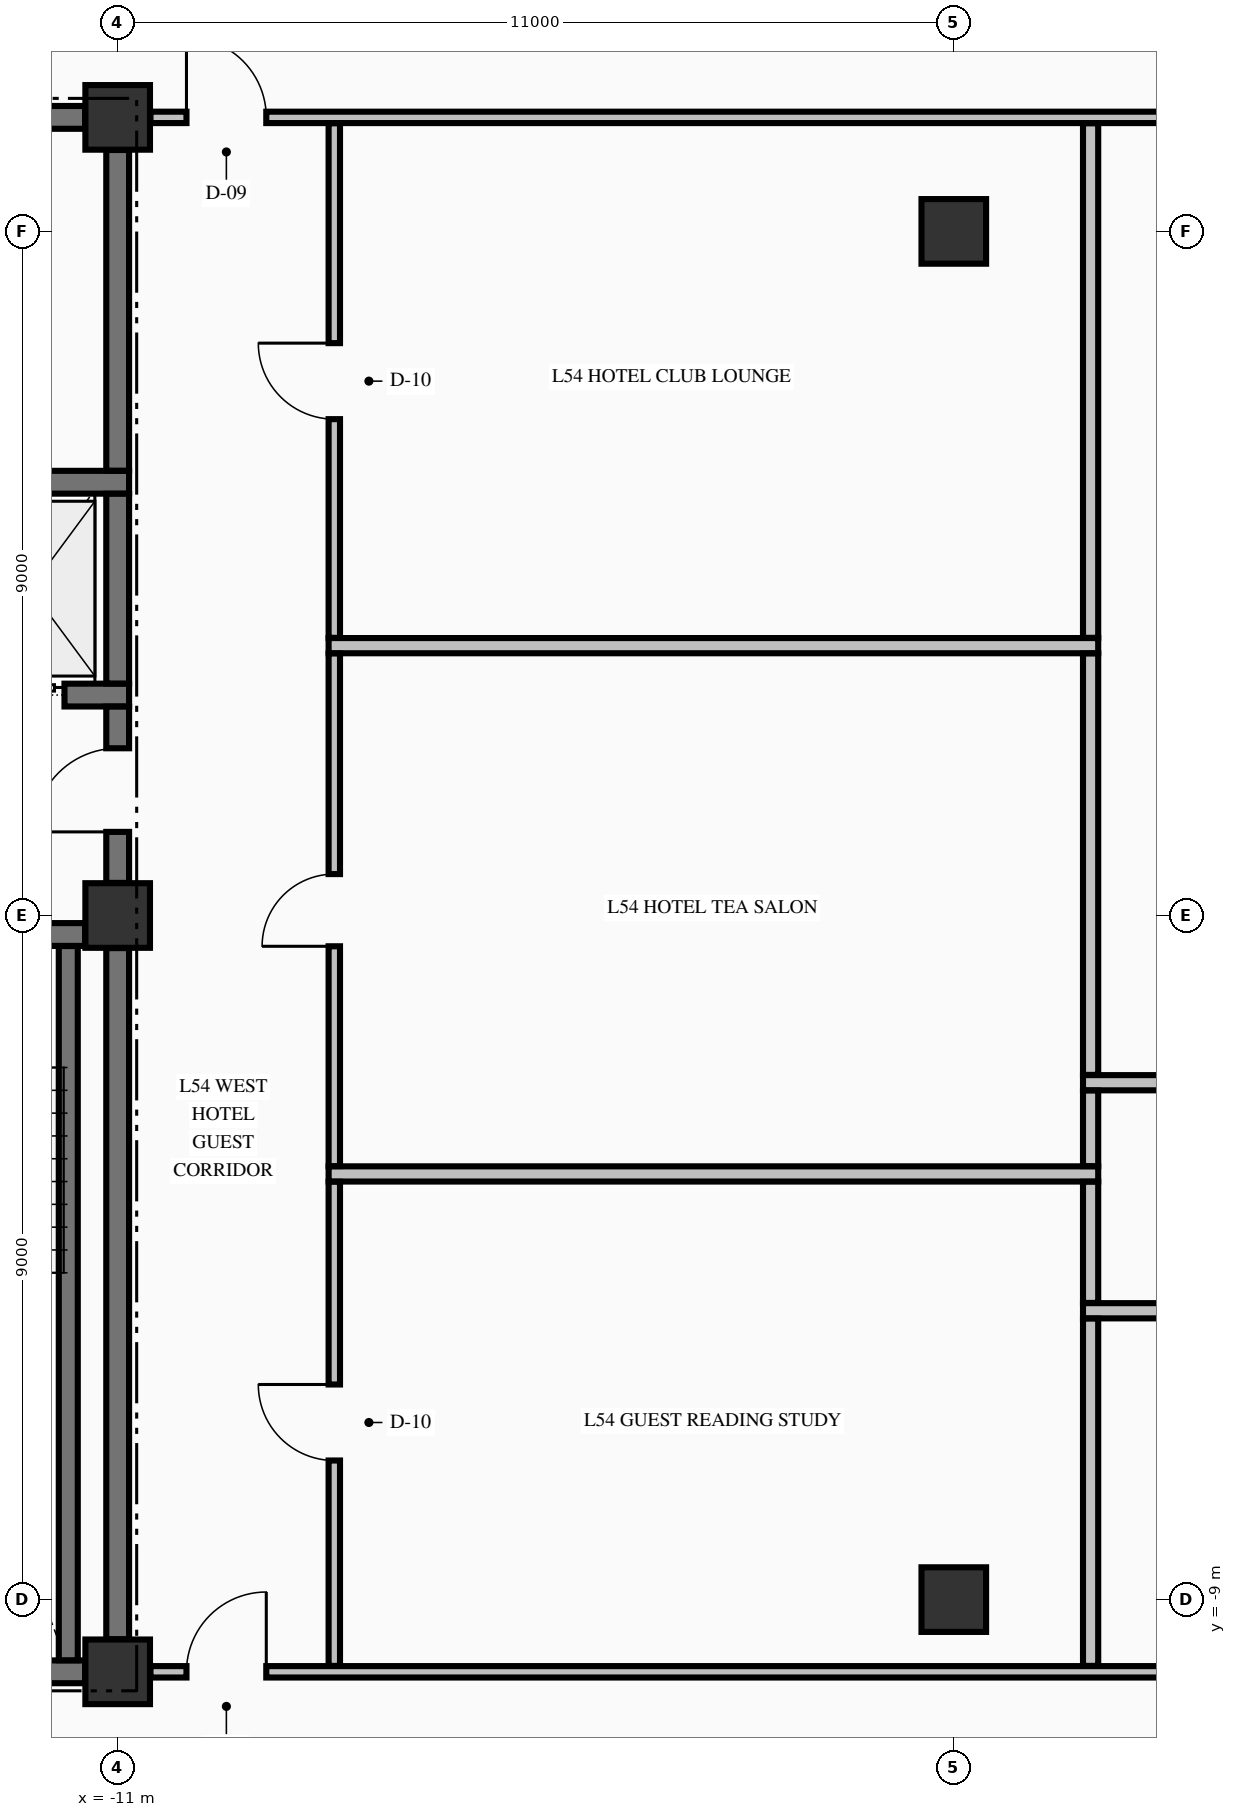
"""IFC4 building model, lengths in metres.
Left out: names, types, materials, properties, quantities, classifications, styles, units other than length and angle.
Written with IfcOpenShell. Run it as: python <this file> out.ifc"""

import sys

from ifc_helpers import new_model, si_unit, direction, frame, frame_2d, origin, origin_2d, place, context, subcontext, project, spatial, rectangle, extrude, element, fill, save


model = new_model("IFC4")
c1 = context("Model", 3, precision=1e-05, world=origin(), true_north=direction((0.0, 1.0)))
c2 = subcontext(c1, "Body", "Model", "MODEL_VIEW")
j1 = project(units=[si_unit("LENGTHUNIT", "METRE"), si_unit("PLANEANGLEUNIT", "RADIAN")], contexts=[c1])
p1 = place(None, origin())
s1 = spatial("IfcSite", under=j1, at=p1, CompositionType="ELEMENT")
p2 = place(p1, origin())
s2 = spatial("IfcBuilding", under=s1, at=p2, CompositionType="ELEMENT")
p3 = place(p2, frame((0.0, 0.0, 208.46)))
s3 = spatial("IfcBuildingStorey", under=s2, at=p3, CompositionType="ELEMENT", Elevation=208.46)
for number, where, z_axis, x_axis in (
    (1, (-11.0, -9.95, -0.25), (0.0, 0.0, 1.0), (1.0, 0.0, 0.0)),
    (2, (-11.0, 0.0, -0.25), (0.0, 0.0, 1.0), (1.0, 0.0, 0.0)),
    (3, (-11.0, 10.5, -0.25), (0.0, 0.0, 1.0), (1.0, 0.0, 0.0)),
    (4, (0.0, -9.0, -0.25), (0.0, 0.0, 1.0), (1.0, 0.0, 0.0)),
    (5, (0.0, 9.0, -0.25), (0.0, 0.0, 1.0), (1.0, 0.0, 0.0)),
):
    element("IfcColumn", number, at=place(p3, frame(where, z_axis=z_axis, x_axis=x_axis)), inside=s3, PredefinedType="COLUMN", context=c2, shape_type="SweptSolid", body=[
        extrude(rectangle(XDim=0.85, YDim=0.85, at=origin_2d()), origin(), (0.0, 0.0, 1.0), 3.325),
    ])
p4 = place(p3, frame((-14.7, -9.95, 0.0), z_axis=(0.0, 0.0, 1.0), x_axis=(1.0, 0.0, 0.0)))
e6 = element("IfcWall", 6, at=p4, inside=s3, PredefinedType="SHEAR", context=c2, shape_type="SweptSolid", body=[
    extrude(rectangle(XDim=3.271, YDim=0.3, at=frame_2d((1.635, 0.0))), origin(), (0.0, 0.0, 1.0), 3.075),
])
p5 = place(p3, frame((-19.571, -0.25, 0.0), z_axis=(0.0, 0.0, 1.0), x_axis=(1.0, 0.0, 0.0)))
e7 = element("IfcWall", 7, at=p5, inside=s3, PredefinedType="SHEAR", context=c2, shape_type="SweptSolid", body=[
    extrude(rectangle(XDim=8.142, YDim=0.3, at=frame_2d((4.071, 0.0))), origin(), (0.0, 0.0, 1.0), 3.075),
])
p6 = place(p5, frame((5.871, 0.0, 0.0)))
e8 = element("IfcOpeningElement", 8, at=p6, cuts=e7, PredefinedType="OPENING", context=c2, shape_type="SweptSolid", body=[
    extrude(rectangle(XDim=1.1, YDim=2.15, at=frame_2d((0.55, 1.075))), frame((0.0, 0.16, 0.0), z_axis=(0.0, -1.0, 0.0), x_axis=(1.0, 0.0, 0.0)), (0.0, 0.0, 1.0), 0.32),
])
p7 = place(p3, frame((-14.875, 2.9, 0.0), z_axis=(0.0, 0.0, 1.0), x_axis=(1.0, 0.0, 0.0)))
e9 = element("IfcWall", 9, at=p7, inside=s3, PredefinedType="SHEAR", context=c2, shape_type="SweptSolid", body=[
    extrude(rectangle(XDim=4.025, YDim=0.3, at=frame_2d((2.012, 0.0))), origin(), (0.0, 0.0, 1.0), 3.075),
])
p8 = place(p7, frame((2.075, 0.0, 0.0)))
e10 = element("IfcOpeningElement", 10, at=p8, cuts=e9, PredefinedType="OPENING", context=c2, shape_type="SweptSolid", body=[
    extrude(rectangle(XDim=1.1, YDim=2.2, at=frame_2d((0.55, 1.1))), frame((0.0, 0.16, 0.0), z_axis=(0.0, -1.0, 0.0), x_axis=(1.0, 0.0, 0.0)), (0.0, 0.0, 1.0), 0.32),
])
p9 = place(p3, frame((-14.875, 5.7, 0.0), z_axis=(0.0, 0.0, 1.0), x_axis=(1.0, 0.0, 0.0)))
e11 = element("IfcWall", 11, at=p9, inside=s3, PredefinedType="SHEAR", context=c2, shape_type="SweptSolid", body=[
    extrude(rectangle(XDim=4.025, YDim=0.3, at=frame_2d((2.012, 0.0))), origin(), (0.0, 0.0, 1.0), 3.075),
])
p10 = place(p3, frame((-14.7, 10.5, 0.0), z_axis=(0.0, 0.0, 1.0), x_axis=(1.0, 0.0, 0.0)))
e12 = element("IfcWall", 12, at=p10, inside=s3, PredefinedType="SHEAR", context=c2, shape_type="SweptSolid", body=[
    extrude(rectangle(XDim=3.271, YDim=0.3, at=frame_2d((1.635, 0.0))), origin(), (0.0, 0.0, 1.0), 3.075),
])
p11 = place(p10, frame((0.775, 0.0, 0.0)))
e13 = element("IfcOpeningElement", 13, at=p11, cuts=e12, PredefinedType="OPENING", context=c2, shape_type="SweptSolid", body=[
    extrude(rectangle(XDim=0.95, YDim=2.15, at=frame_2d((0.475, 1.075))), frame((0.0, 0.16, 0.0), z_axis=(0.0, -1.0, 0.0), x_axis=(1.0, 0.0, 0.0)), (0.0, 0.0, 1.0), 0.32),
])
p12 = place(p3, frame((-10.569, -9.95, 0.0), z_axis=(0.0, 0.0, 1.0), x_axis=(1.0, 0.0, 0.0)))
e14 = element("IfcWall", 14, at=p12, inside=s3, PredefinedType="PARTITIONING", context=c2, shape_type="SweptSolid", body=[
    extrude(rectangle(XDim=21.138, YDim=0.15, at=frame_2d((10.569, 0.0))), origin(), (0.0, 0.0, 1.0), 3.075),
])
p13 = place(p12, frame((0.474, 0.0, 0.0)))
e15 = element("IfcOpeningElement", 15, at=p13, cuts=e14, PredefinedType="OPENING", context=c2, shape_type="SweptSolid", body=[
    extrude(rectangle(XDim=1.05, YDim=2.15, at=frame_2d((0.525, 1.075))), frame((0.0, 0.085, 0.0), z_axis=(0.0, -1.0, 0.0), x_axis=(1.0, 0.0, 0.0)), (0.0, 0.0, 1.0), 0.17),
])
p14 = place(p12, frame((19.614, 0.0, 0.0)))
e16 = element("IfcOpeningElement", 16, at=p14, cuts=e14, PredefinedType="OPENING", context=c2, shape_type="SweptSolid", body=[
    extrude(rectangle(XDim=1.05, YDim=2.15, at=frame_2d((0.525, 1.075))), frame((0.0, 0.085, 0.0), z_axis=(0.0, -1.0, 0.0), x_axis=(1.0, 0.0, 0.0)), (0.0, 0.0, 1.0), 0.17),
])
p15 = place(p12, frame((13.574, 0.0, 0.0)))
e17 = element("IfcOpeningElement", 17, at=p15, cuts=e14, PredefinedType="OPENING", context=c2, shape_type="SweptSolid", body=[
    extrude(rectangle(XDim=0.95, YDim=2.15, at=frame_2d((0.475, 1.075))), frame((0.0, 0.085, 0.0), z_axis=(0.0, -1.0, 0.0), x_axis=(1.0, 0.0, 0.0)), (0.0, 0.0, 1.0), 0.17),
])
p16 = place(p3, frame((1.7, -5.2, 0.0), z_axis=(0.0, 0.0, 1.0), x_axis=(1.0, 0.0, 0.0)))
e18 = element("IfcWall", 18, at=p16, inside=s3, PredefinedType="PARTITIONING", context=c2, shape_type="SweptSolid", body=[
    extrude(rectangle(XDim=6.525, YDim=0.2, at=frame_2d((3.263, 0.0))), origin(), (0.0, 0.0, 1.0), 3.075),
])
p17 = place(p3, frame((-8.225, -3.4, 0.0), z_axis=(0.0, 0.0, 1.0), x_axis=(1.0, 0.0, 0.0)))
e19 = element("IfcWall", 19, at=p17, inside=s3, PredefinedType="PARTITIONING", context=c2, shape_type="SweptSolid", body=[
    extrude(rectangle(XDim=10.125, YDim=0.2, at=frame_2d((5.062, 0.0))), origin(), (0.0, 0.0, 1.0), 3.075),
])
p18 = place(p3, frame((1.7, -2.2, 0.0), z_axis=(0.0, 0.0, 1.0), x_axis=(1.0, 0.0, 0.0)))
e20 = element("IfcWall", 20, at=p18, inside=s3, PredefinedType="PARTITIONING", context=c2, shape_type="SweptSolid", body=[
    extrude(rectangle(XDim=6.525, YDim=0.2, at=frame_2d((3.263, 0.0))), origin(), (0.0, 0.0, 1.0), 3.075),
])
p19 = place(p3, frame((-8.225, 3.55, 0.0), z_axis=(0.0, 0.0, 1.0), x_axis=(1.0, 0.0, 0.0)))
e21 = element("IfcWall", 21, at=p19, inside=s3, PredefinedType="PARTITIONING", context=c2, shape_type="SweptSolid", body=[
    extrude(rectangle(XDim=10.125, YDim=0.2, at=frame_2d((5.062, 0.0))), origin(), (0.0, 0.0, 1.0), 3.075),
])
p20 = place(p3, frame((-10.569, 10.5, 0.0), z_axis=(0.0, 0.0, 1.0), x_axis=(1.0, 0.0, 0.0)))
e22 = element("IfcWall", 22, at=p20, inside=s3, PredefinedType="PARTITIONING", context=c2, shape_type="SweptSolid", body=[
    extrude(rectangle(XDim=21.138, YDim=0.15, at=frame_2d((10.569, 0.0))), origin(), (0.0, 0.0, 1.0), 3.075),
])
p21 = place(p20, frame((0.474, 0.0, 0.0)))
e23 = element("IfcOpeningElement", 23, at=p21, cuts=e22, PredefinedType="OPENING", context=c2, shape_type="SweptSolid", body=[
    extrude(rectangle(XDim=1.05, YDim=2.15, at=frame_2d((0.525, 1.075))), frame((0.0, 0.085, 0.0), z_axis=(0.0, -1.0, 0.0), x_axis=(1.0, 0.0, 0.0)), (0.0, 0.0, 1.0), 0.17),
])
p22 = place(p20, frame((19.614, 0.0, 0.0)))
e24 = element("IfcOpeningElement", 24, at=p22, cuts=e22, PredefinedType="OPENING", context=c2, shape_type="SweptSolid", body=[
    extrude(rectangle(XDim=1.05, YDim=2.15, at=frame_2d((0.525, 1.075))), frame((0.0, 0.085, 0.0), z_axis=(0.0, -1.0, 0.0), x_axis=(1.0, 0.0, 0.0)), (0.0, 0.0, 1.0), 0.17),
])
p23 = place(p3, frame((-11.65, -9.798, 0.0), z_axis=(0.0, 0.0, 1.0), x_axis=(0.0, 1.0, 0.0)))
e25 = element("IfcWall", 25, at=p23, inside=s3, PredefinedType="SOLIDWALL", context=c2, shape_type="SweptSolid", body=[
    extrude(rectangle(XDim=9.396, YDim=0.25, at=frame_2d((4.698, 0.0))), origin(), (0.0, 0.0, 1.0), 3.075),
])
p24 = place(p3, frame((-11.0, -9.521, 0.0), z_axis=(0.0, 0.0, 1.0), x_axis=(0.0, 1.0, 0.0)))
e26 = element("IfcWall", 26, at=p24, inside=s3, PredefinedType="SHEAR", context=c2, shape_type="SweptSolid", body=[
    extrude(rectangle(XDim=9.092, YDim=0.3, at=frame_2d((4.546, 0.0))), origin(), (0.0, 0.0, 1.0), 3.075),
])
p25 = place(p3, frame((-11.0, 0.429, 0.0), z_axis=(0.0, 0.0, 1.0), x_axis=(0.0, 1.0, 0.0)))
e27 = element("IfcWall", 27, at=p25, inside=s3, PredefinedType="SHEAR", context=c2, shape_type="SweptSolid", body=[
    extrude(rectangle(XDim=2.319, YDim=0.3, at=frame_2d((1.16, 0.0))), origin(), (0.0, 0.0, 1.0), 3.075),
])
p26 = place(p25, frame((0.671, 0.0, 0.0)))
e28 = element("IfcOpeningElement", 28, at=p26, cuts=e27, PredefinedType="OPENING", context=c2, shape_type="SweptSolid", body=[
    extrude(rectangle(XDim=1.1, YDim=2.15, at=frame_2d((0.55, 1.075))), frame((0.0, 0.16, 0.0), z_axis=(0.0, -1.0, 0.0), x_axis=(1.0, 0.0, 0.0)), (0.0, 0.0, 1.0), 0.32),
])
p27 = place(p3, frame((-11.0, 3.052, 0.0), z_axis=(0.0, 0.0, 1.0), x_axis=(0.0, 1.0, 0.0)))
e29 = element("IfcWall", 29, at=p27, inside=s3, PredefinedType="SHEAR", context=c2, shape_type="SweptSolid", body=[
    extrude(rectangle(XDim=2.496, YDim=0.3, at=frame_2d((1.248, 0.0))), origin(), (0.0, 0.0, 1.0), 3.075),
])
p28 = place(p3, frame((-11.0, 5.852, 0.0), z_axis=(0.0, 0.0, 1.0), x_axis=(0.0, 1.0, 0.0)))
e30 = element("IfcWall", 30, at=p28, inside=s3, PredefinedType="SHEAR", context=c2, shape_type="SweptSolid", body=[
    extrude(rectangle(XDim=4.219, YDim=0.3, at=frame_2d((2.109, 0.0))), origin(), (0.0, 0.0, 1.0), 3.075),
])
p29 = place(p3, frame((-8.15, -9.872, 0.0), z_axis=(0.0, 0.0, 1.0), x_axis=(0.0, 1.0, 0.0)))
e31 = element("IfcWall", 31, at=p29, inside=s3, PredefinedType="PARTITIONING", context=c2, shape_type="SweptSolid", body=[
    extrude(rectangle(XDim=6.369, YDim=0.15, at=frame_2d((3.185, 0.0))), origin(), (0.0, 0.0, 1.0), 3.075),
])
p30 = place(p29, frame((2.702, 0.0, 0.0)))
e32 = element("IfcOpeningElement", 32, at=p30, cuts=e31, PredefinedType="OPENING", context=c2, shape_type="SweptSolid", body=[
    extrude(rectangle(XDim=1.0, YDim=2.15, at=frame_2d((0.5, 1.075))), frame((0.0, 0.085, 0.0), z_axis=(0.0, -1.0, 0.0), x_axis=(1.0, 0.0, 0.0)), (0.0, 0.0, 1.0), 0.17),
])
p31 = place(p3, frame((-8.15, -3.297, 0.0), z_axis=(0.0, 0.0, 1.0), x_axis=(0.0, 1.0, 0.0)))
e33 = element("IfcWall", 33, at=p31, inside=s3, PredefinedType="PARTITIONING", context=c2, shape_type="SweptSolid", body=[
    extrude(rectangle(XDim=6.744, YDim=0.15, at=frame_2d((3.372, 0.0))), origin(), (0.0, 0.0, 1.0), 3.075),
])
p32 = place(p31, frame((2.892, 0.0, 0.0)))
e34 = element("IfcOpeningElement", 34, at=p32, cuts=e33, PredefinedType="OPENING", context=c2, shape_type="SweptSolid", body=[
    extrude(rectangle(XDim=0.95, YDim=2.15, at=frame_2d((0.475, 1.075))), frame((0.0, 0.085, 0.0), z_axis=(0.0, -1.0, 0.0), x_axis=(1.0, 0.0, 0.0)), (0.0, 0.0, 1.0), 0.17),
])
p33 = place(p3, frame((-8.15, 3.653, 0.0), z_axis=(0.0, 0.0, 1.0), x_axis=(0.0, 1.0, 0.0)))
e35 = element("IfcWall", 35, at=p33, inside=s3, PredefinedType="PARTITIONING", context=c2, shape_type="SweptSolid", body=[
    extrude(rectangle(XDim=6.769, YDim=0.15, at=frame_2d((3.385, 0.0))), origin(), (0.0, 0.0, 1.0), 3.075),
])
p34 = place(p33, frame((2.877, 0.0, 0.0)))
e36 = element("IfcOpeningElement", 36, at=p34, cuts=e35, PredefinedType="OPENING", context=c2, shape_type="SweptSolid", body=[
    extrude(rectangle(XDim=1.0, YDim=2.15, at=frame_2d((0.5, 1.075))), frame((0.0, 0.085, 0.0), z_axis=(0.0, -1.0, 0.0), x_axis=(1.0, 0.0, 0.0)), (0.0, 0.0, 1.0), 0.17),
])
p35 = place(p3, frame((1.8, -9.872, 0.0), z_axis=(0.0, 0.0, 1.0), x_axis=(0.0, 1.0, 0.0)))
e37 = element("IfcWall", 37, at=p35, inside=s3, PredefinedType="PARTITIONING", context=c2, shape_type="SweptSolid", body=[
    extrude(rectangle(XDim=4.569, YDim=0.2, at=frame_2d((2.285, 0.0))), origin(), (0.0, 0.0, 1.0), 3.075),
])
p36 = place(p3, frame((1.8, -5.097, 0.0), z_axis=(0.0, 0.0, 1.0), x_axis=(0.0, 1.0, 0.0)))
e38 = element("IfcWall", 38, at=p36, inside=s3, PredefinedType="PARTITIONING", context=c2, shape_type="SweptSolid", body=[
    extrude(rectangle(XDim=1.594, YDim=0.2, at=frame_2d((0.797, 0.0))), origin(), (0.0, 0.0, 1.0), 3.075),
])
p37 = place(p3, frame((1.8, -3.297, 0.0), z_axis=(0.0, 0.0, 1.0), x_axis=(0.0, 1.0, 0.0)))
e39 = element("IfcWall", 39, at=p37, inside=s3, PredefinedType="PARTITIONING", context=c2, shape_type="SweptSolid", body=[
    extrude(rectangle(XDim=0.994, YDim=0.2, at=frame_2d((0.497, 0.0))), origin(), (0.0, 0.0, 1.0), 3.075),
])
p38 = place(p3, frame((1.8, -2.097, 0.0), z_axis=(0.0, 0.0, 1.0), x_axis=(0.0, 1.0, 0.0)))
e40 = element("IfcWall", 40, at=p38, inside=s3, PredefinedType="PARTITIONING", context=c2, shape_type="SweptSolid", body=[
    extrude(rectangle(XDim=5.544, YDim=0.2, at=frame_2d((2.772, 0.0))), origin(), (0.0, 0.0, 1.0), 3.075),
])
p39 = place(p3, frame((1.8, 3.653, 0.0), z_axis=(0.0, 0.0, 1.0), x_axis=(0.0, 1.0, 0.0)))
e41 = element("IfcWall", 41, at=p39, inside=s3, PredefinedType="PARTITIONING", context=c2, shape_type="SweptSolid", body=[
    extrude(rectangle(XDim=6.769, YDim=0.2, at=frame_2d((3.385, 0.0))), origin(), (0.0, 0.0, 1.0), 3.075),
])
p40 = place(p26, origin())
e42 = element("IfcDoor", 42, at=p40, inside=s3, OperationType="SINGLE_SWING_LEFT", PredefinedType="DOOR", context=c2, shape_type="SweptSolid", body=[
    extrude(rectangle(XDim=1.1, YDim=2.15, at=frame_2d((0.55, 1.075))), frame((0.0, 0.025, 0.0), z_axis=(0.0, -1.0, 0.0), x_axis=(1.0, 0.0, 0.0)), (0.0, 0.0, 1.0), 0.05),
])
fill(e28, e42)
p41 = place(p8, origin())
e43 = element("IfcDoor", 43, at=p41, inside=s3, OperationType="SLIDING_TO_LEFT", PredefinedType="DOOR", context=c2, shape_type="SweptSolid", body=[
    extrude(rectangle(XDim=1.1, YDim=2.2, at=frame_2d((0.55, 1.1))), frame((0.0, 0.025, 0.0), z_axis=(0.0, -1.0, 0.0), x_axis=(1.0, 0.0, 0.0)), (0.0, 0.0, 1.0), 0.05),
])
fill(e10, e43)
p42 = place(p21, origin())
e44 = element("IfcDoor", 44, at=p42, inside=s3, OperationType="SINGLE_SWING_LEFT", PredefinedType="DOOR", context=c2, shape_type="SweptSolid", body=[
    extrude(rectangle(XDim=1.05, YDim=2.15, at=frame_2d((0.525, 1.075))), frame((0.0, 0.025, 0.0), z_axis=(0.0, -1.0, 0.0), x_axis=(1.0, 0.0, 0.0)), (0.0, 0.0, 1.0), 0.05),
])
fill(e23, e44)
p43 = place(p13, origin())
e45 = element("IfcDoor", 45, at=p43, inside=s3, OperationType="SINGLE_SWING_RIGHT", PredefinedType="DOOR", context=c2, shape_type="SweptSolid", body=[
    extrude(rectangle(XDim=1.05, YDim=2.15, at=frame_2d((0.525, 1.075))), frame((0.0, 0.025, 0.0), z_axis=(0.0, -1.0, 0.0), x_axis=(1.0, 0.0, 0.0)), (0.0, 0.0, 1.0), 0.05),
])
fill(e15, e45)
p44 = place(p34, origin())
e46 = element("IfcDoor", 46, at=p44, inside=s3, OperationType="SINGLE_SWING_RIGHT", PredefinedType="DOOR", context=c2, shape_type="SweptSolid", body=[
    extrude(rectangle(XDim=1.0, YDim=2.15, at=frame_2d((0.5, 1.075))), frame((0.0, 0.025, 0.0), z_axis=(0.0, -1.0, 0.0), x_axis=(1.0, 0.0, 0.0)), (0.0, 0.0, 1.0), 0.05),
])
fill(e36, e46)
p45 = place(p32, origin())
e47 = element("IfcDoor", 47, at=p45, inside=s3, OperationType="SINGLE_SWING_LEFT", PredefinedType="DOOR", context=c2, shape_type="SweptSolid", body=[
    extrude(rectangle(XDim=0.95, YDim=2.15, at=frame_2d((0.475, 1.075))), frame((0.0, 0.025, 0.0), z_axis=(0.0, -1.0, 0.0), x_axis=(1.0, 0.0, 0.0)), (0.0, 0.0, 1.0), 0.05),
])
fill(e34, e47)
p46 = place(p30, origin())
e48 = element("IfcDoor", 48, at=p46, inside=s3, OperationType="SINGLE_SWING_RIGHT", PredefinedType="DOOR", context=c2, shape_type="SweptSolid", body=[
    extrude(rectangle(XDim=1.0, YDim=2.15, at=frame_2d((0.5, 1.075))), frame((0.0, 0.025, 0.0), z_axis=(0.0, -1.0, 0.0), x_axis=(1.0, 0.0, 0.0)), (0.0, 0.0, 1.0), 0.05),
])
fill(e32, e48)
save(model, sys.argv[1])
